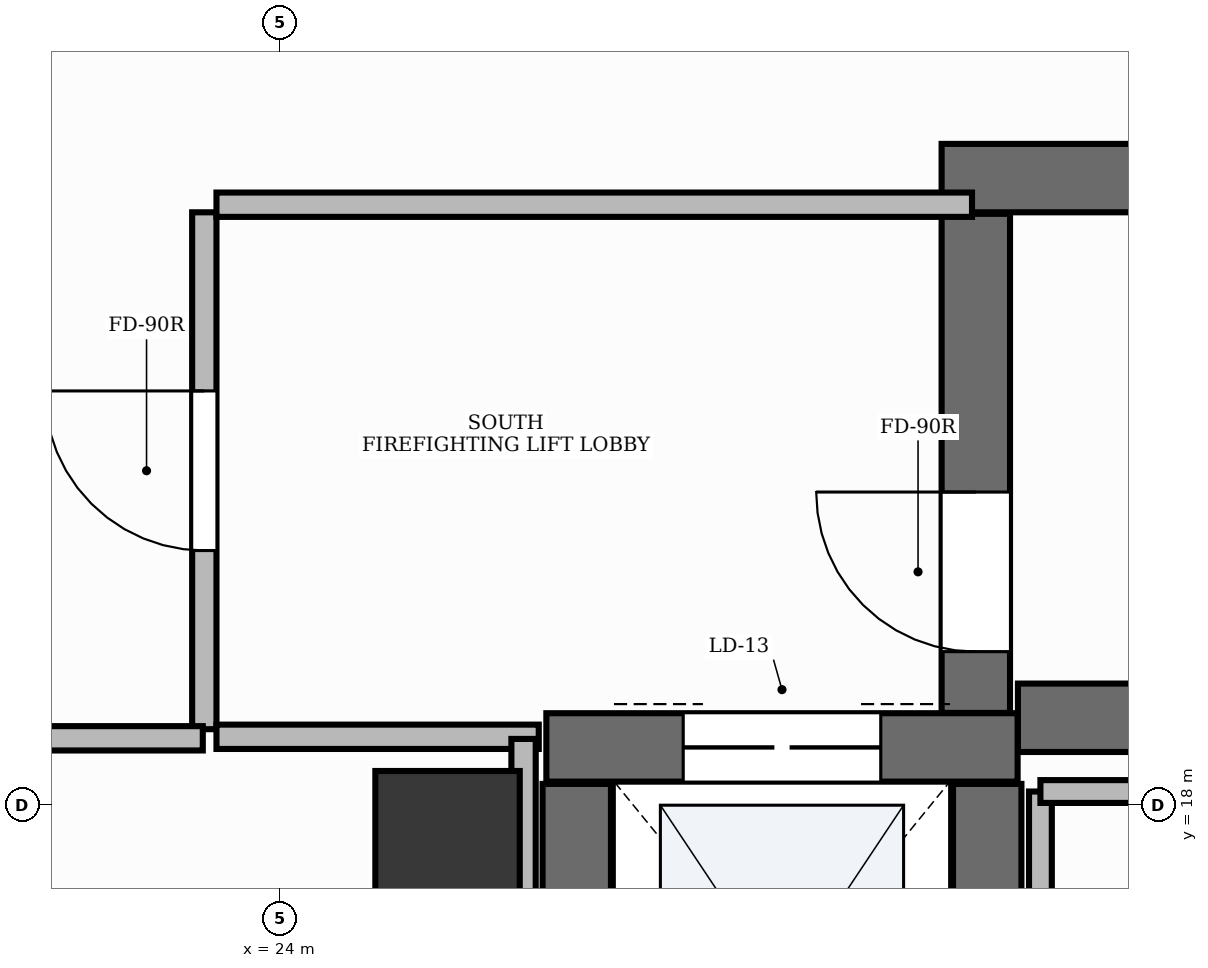
"""IFC4 building model, lengths in metres.
Left out: names, types, materials, properties, quantities, classifications, styles, units other than length and angle.
Written with IfcOpenShell. Run it as: python <this file> out.ifc"""

import sys

from ifc_helpers import new_model, si_unit, direction, frame, frame_2d, origin, origin_2d, place, context, subcontext, project, spatial, rectangle, extrude, element, fill, save


model = new_model("IFC4")
c1 = context("Model", 3, precision=1e-05, world=origin(), true_north=direction((0.0, 1.0)))
c2 = subcontext(c1, "Body", "Model", "MODEL_VIEW")
j1 = project(units=[si_unit("LENGTHUNIT", "METRE"), si_unit("PLANEANGLEUNIT", "RADIAN")], contexts=[c1])
p1 = place(None, origin())
s1 = spatial("IfcSite", under=j1, at=p1, CompositionType="ELEMENT")
p2 = place(p1, origin())
s2 = spatial("IfcBuilding", under=s1, at=p2, CompositionType="ELEMENT")
p3 = place(p2, frame((0.0, 0.0, 25.8)))
s3 = spatial("IfcBuildingStorey", under=s2, at=p3, CompositionType="ELEMENT", Elevation=25.8)
p4 = place(p3, frame((28.852, 18.575, 0.0), z_axis=(0.0, 0.0, 1.0), x_axis=(1.0, 0.0, 0.0)))
e1 = element("IfcWall", 1, at=p4, inside=s3, PredefinedType="SHEAR", context=c2, shape_type="SweptSolid", body=[
    extrude(rectangle(XDim=8.248, YDim=0.45, at=frame_2d((4.124, 0.0))), origin(), (0.0, 0.0, 1.0), 3.9),
])
p5 = place(p3, frame((28.35, 22.125, 0.0), z_axis=(0.0, 0.0, 1.0), x_axis=(1.0, 0.0, 0.0)))
e2 = element("IfcWall", 2, at=p5, inside=s3, PredefinedType="SHEAR", context=c2, shape_type="SweptSolid", body=[
    extrude(rectangle(XDim=8.75, YDim=0.45, at=frame_2d((4.375, 0.0))), origin(), (0.0, 0.0, 1.0), 3.9),
])
p6 = place(p3, frame((28.575, 18.607, 0.0), z_axis=(0.0, 0.0, 1.0), x_axis=(0.0, 1.0, 0.0)))
e3 = element("IfcWall", 3, at=p6, inside=s3, PredefinedType="SHEAR", context=c2, shape_type="SweptSolid", body=[
    extrude(rectangle(XDim=3.283, YDim=0.45, at=frame_2d((1.642, 0.0))), origin(), (0.0, 0.0, 1.0), 3.9),
])
p7 = place(p6, frame((0.403, 0.0, 0.0)))
e4 = element("IfcOpeningElement", 4, at=p7, cuts=e3, PredefinedType="OPENING", context=c2, shape_type="SweptSolid", body=[
    extrude(rectangle(XDim=1.05, YDim=2.15, at=frame_2d((0.525, 1.075))), frame((0.0, 0.24, 0.0), z_axis=(0.0, -1.0, 0.0), x_axis=(1.0, 0.0, 0.0)), (0.0, 0.0, 1.0), 0.48),
])
p8 = place(p3, frame((25.75, 18.38, 0.0), z_axis=(0.0, 0.0, 1.0), x_axis=(1.0, 0.0, 0.0)))
e5 = element("IfcWall", 5, at=p8, inside=s3, PredefinedType="SHEAR", context=c2, shape_type="SweptSolid", body=[
    extrude(rectangle(XDim=3.1, YDim=0.45, at=frame_2d((1.55, 0.0))), origin(), (0.0, 0.0, 1.0), 3.9),
])
p9 = place(p8, frame((0.9, 0.0, 0.0)))
e6 = element("IfcOpeningElement", 6, at=p9, cuts=e5, PredefinedType="OPENING", context=c2, shape_type="SweptSolid", body=[
    extrude(rectangle(XDim=1.3, YDim=2.2, at=frame_2d((0.65, 1.1))), frame((0.0, 0.24, 0.0), z_axis=(0.0, -1.0, 0.0), x_axis=(1.0, 0.0, 0.0)), (0.0, 0.0, 1.0), 0.48),
])
for number, where, z_axis, x_axis in (
    (7, (25.95, 15.44, 0.0), (0.0, 0.0, 1.0), (0.0, 1.0, 0.0)),
    (8, (28.65, 15.44, 0.0), (0.0, 0.0, 1.0), (0.0, 1.0, 0.0)),
):
    element("IfcWall", number, at=place(p3, frame(where, z_axis=z_axis, x_axis=x_axis)), inside=s3, PredefinedType="SHEAR", context=c2, shape_type="SweptSolid", body=[
        extrude(rectangle(XDim=2.7, YDim=0.45, at=frame_2d((1.35, 0.0))), origin(), (0.0, 0.0, 1.0), 3.9),
    ])
p10 = place(p3, frame((25.1, 17.75, -0.0), z_axis=(0.0, 0.0, 1.0), x_axis=(1.0, 0.0, 0.0)))
e9 = element("IfcColumn", 9, at=p10, inside=s3, PredefinedType="PILASTER", context=c2, shape_type="SweptSolid", body=[
    extrude(rectangle(XDim=0.95, YDim=0.95, at=origin_2d()), origin(), (0.0, 0.0, 1.0), 3.901),
])
p11 = place(p3, frame((23.5, 18.5, 0.0), z_axis=(0.0, 0.0, 1.0), x_axis=(0.0, 1.0, 0.0)))
e10 = element("IfcWall", 10, at=p11, inside=s3, PredefinedType="PARTITIONING", context=c2, shape_type="SweptSolid", body=[
    extrude(rectangle(XDim=3.4, YDim=0.16, at=frame_2d((1.7, 0.0))), origin(), (0.0, 0.0, 1.0), 2.91),
])
p12 = place(p11, frame((1.175, 0.0, 0.0)))
e11 = element("IfcOpeningElement", 11, at=p12, cuts=e10, PredefinedType="OPENING", context=c2, shape_type="SweptSolid", body=[
    extrude(rectangle(XDim=1.05, YDim=2.15, at=frame_2d((0.525, 1.075))), frame((0.0, 0.095, 0.0), z_axis=(0.0, -1.0, 0.0), x_axis=(1.0, 0.0, 0.0)), (0.0, 0.0, 1.0), 0.19),
])
p13 = place(p3, frame((23.58, 21.95, 0.0), z_axis=(0.0, 0.0, 1.0), x_axis=(1.0, 0.0, 0.0)))
e12 = element("IfcWall", 12, at=p13, inside=s3, PredefinedType="PARTITIONING", context=c2, shape_type="SweptSolid", body=[
    extrude(rectangle(XDim=4.97, YDim=0.16, at=frame_2d((2.485, 0.0))), origin(), (0.0, 0.0, 1.0), 2.91),
])
p14 = place(p3, frame((23.58, 18.45, 0.0), z_axis=(0.0, 0.0, 1.0), x_axis=(1.0, 0.0, 0.0)))
e13 = element("IfcWall", 13, at=p14, inside=s3, PredefinedType="PARTITIONING", context=c2, shape_type="SweptSolid", body=[
    extrude(rectangle(XDim=2.12, YDim=0.16, at=frame_2d((1.06, 0.0))), origin(), (0.0, 0.0, 1.0), 2.91),
])
p15 = place(p3, frame((17.011, 18.44, 0.0), z_axis=(0.0, 0.0, 1.0), x_axis=(1.0, 0.0, 0.0)))
e14 = element("IfcWall", 14, at=p15, inside=s3, PredefinedType="PARTITIONING", context=c2, shape_type="SweptSolid", body=[
    extrude(rectangle(XDim=6.479, YDim=0.16, at=frame_2d((3.24, 0.0))), origin(), (0.0, 0.0, 1.0), 2.91),
])
p16 = place(p15, frame((3.619, 0.0, 0.0)))
e15 = element("IfcOpeningElement", 15, at=p16, cuts=e14, PredefinedType="OPENING", context=c2, shape_type="SweptSolid", body=[
    extrude(rectangle(XDim=0.95, YDim=2.15, at=frame_2d((0.475, 1.075))), frame((0.0, 0.095, 0.0), z_axis=(0.0, -1.0, 0.0), x_axis=(1.0, 0.0, 0.0)), (0.0, 0.0, 1.0), 0.19),
])
p17 = place(p3, frame((25.6, 18.436, 0.0), z_axis=(0.0, 0.0, 1.0), x_axis=(0.0, -1.0, 0.0)))
e16 = element("IfcWall", 16, at=p17, inside=s3, PredefinedType="PARTITIONING", context=c2, shape_type="SweptSolid", body=[
    extrude(rectangle(XDim=3.482, YDim=0.16, at=frame_2d((1.741, 0.0))), origin(), (0.0, 0.0, 1.0), 2.91),
])
p18 = place(p3, frame((29.0, 14.954, 0.0), z_axis=(0.0, 0.0, 1.0), x_axis=(0.0, 1.0, 0.0)))
e17 = element("IfcWall", 17, at=p18, inside=s3, PredefinedType="PARTITIONING", context=c2, shape_type="SweptSolid", body=[
    extrude(rectangle(XDim=3.136, YDim=0.15, at=frame_2d((1.568, 0.0))), origin(), (0.0, 0.0, 1.0), 2.91),
])
p19 = place(p3, frame((29.0, 18.09, 0.0), z_axis=(0.0, 0.0, 1.0), x_axis=(1.0, 0.0, 0.0)))
e18 = element("IfcWall", 18, at=p19, inside=s3, PredefinedType="PARTITIONING", context=c2, shape_type="SweptSolid", body=[
    extrude(rectangle(XDim=8.35, YDim=0.15, at=frame_2d((4.175, 0.0))), origin(), (0.0, 0.0, 1.0), 2.91),
])
p20 = place(p7, origin())
e19 = element("IfcDoor", 19, at=p20, inside=s3, OperationType="SINGLE_SWING_RIGHT", PredefinedType="DOOR", context=c2, shape_type="SweptSolid", body=[
    extrude(rectangle(XDim=1.05, YDim=2.15, at=frame_2d((0.525, 1.075))), frame((0.0, 0.025, 0.0), z_axis=(0.0, -1.0, 0.0), x_axis=(1.0, 0.0, 0.0)), (0.0, 0.0, 1.0), 0.05),
])
fill(e4, e19)
p21 = place(p9, origin())
e20 = element("IfcDoor", 20, at=p21, inside=s3, OperationType="DOUBLE_DOOR_SLIDING", PredefinedType="DOOR", context=c2, shape_type="SweptSolid", body=[
    extrude(rectangle(XDim=1.3, YDim=2.2, at=frame_2d((0.65, 1.1))), frame((0.0, 0.025, 0.0), z_axis=(0.0, -1.0, 0.0), x_axis=(1.0, 0.0, 0.0)), (0.0, 0.0, 1.0), 0.05),
])
fill(e6, e20)
p22 = place(p12, origin())
e21 = element("IfcDoor", 21, at=p22, inside=s3, OperationType="SINGLE_SWING_RIGHT", PredefinedType="DOOR", context=c2, shape_type="SweptSolid", body=[
    extrude(rectangle(XDim=1.05, YDim=2.15, at=frame_2d((0.525, 1.075))), frame((0.0, 0.025, 0.0), z_axis=(0.0, -1.0, 0.0), x_axis=(1.0, 0.0, 0.0)), (0.0, 0.0, 1.0), 0.05),
])
fill(e11, e21)
save(model, sys.argv[1])
